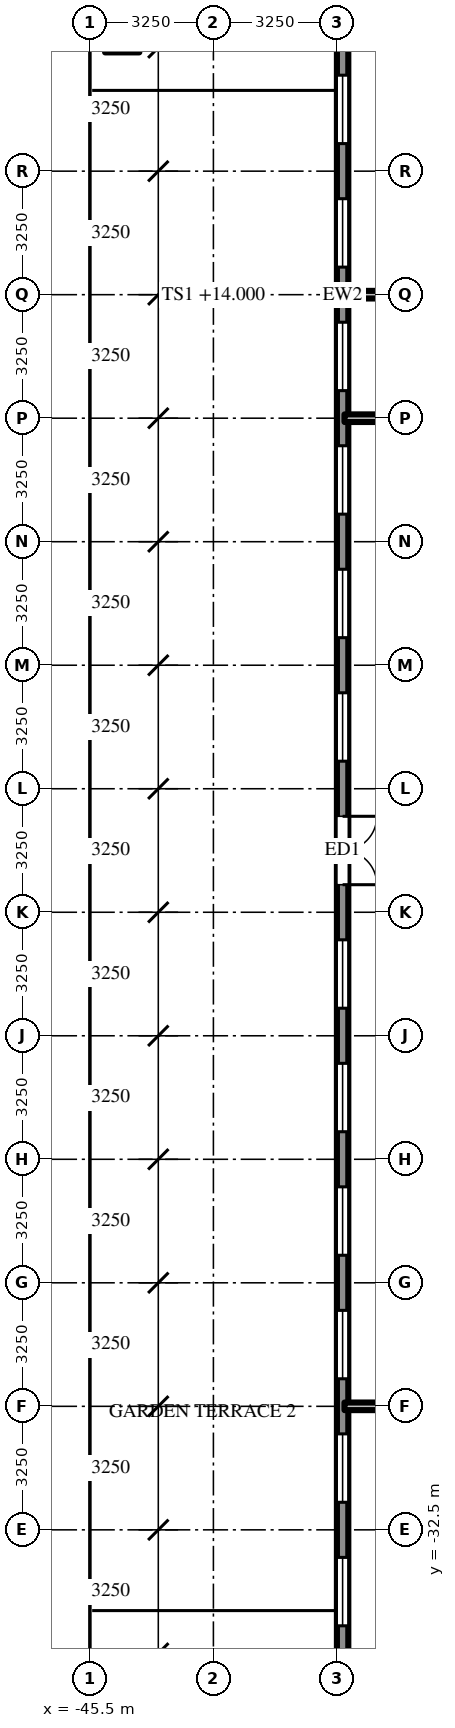
"""IFC4 building model, lengths in metres.
Left out: names, types, materials, properties, quantities, classifications, styles, units other than length and angle.
Written with IfcOpenShell. Run it as: python <this file> out.ifc"""

import sys

from ifc_helpers import new_model, si_unit, direction, frame, frame_2d, origin, place, context, subcontext, project, spatial, rectangle, extrude, source, transform, mapped, element, fill, save


model = new_model("IFC4")
c1 = context("Model", 3, precision=1e-05, world=origin(), true_north=direction((0.0, 1.0)))
c2 = subcontext(c1, "Body", "Model", "MODEL_VIEW")
j1 = project(units=[si_unit("LENGTHUNIT", "METRE"), si_unit("PLANEANGLEUNIT", "RADIAN")], contexts=[c1])
p1 = place(None, origin())
s1 = spatial("IfcSite", under=j1, at=p1, CompositionType="ELEMENT")
p2 = place(p1, origin())
s2 = spatial("IfcBuilding", under=s1, at=p2, CompositionType="ELEMENT")
p3 = place(p2, frame((0.0, 0.0, 14.0)))
s3 = spatial("IfcBuildingStorey", under=s2, at=p3, CompositionType="ELEMENT", Elevation=14.0)
m1 = source(origin(), c2, "Body", "SweptSolid", [
    extrude(rectangle(XDim=71.5, YDim=0.3, at=frame_2d((35.75, 0.0))), origin(), (0.0, 0.0, 1.0), 4.7),
])
p4 = place(p3, frame((-38.85, 35.75, 0.0), z_axis=(0.0, 0.0, 1.0), x_axis=(0.0, -1.0, 0.0)))
e1 = element("IfcWall", 1, at=p4, inside=s3, PredefinedType="SOLIDWALL", context=c2, shape_type="MappedRepresentation", body=[
    mapped(m1, transform((0.0, 0.0, 0.0))),
])
m2 = source(origin(), c2, "Body", "SweptSolid", [
    extrude(rectangle(XDim=1.8, YDim=3.0, at=frame_2d((0.9, 1.5))), frame((0.0, 0.16, 0.0), z_axis=(0.0, -1.0, 0.0), x_axis=(1.0, 0.0, 0.0)), (0.0, 0.0, 1.0), 0.32),
])
p5 = place(p4, frame((0.725, 0.0, 0.9)))
e2 = element("IfcOpeningElement", 2, at=p5, cuts=e1, PredefinedType="OPENING", context=c2, shape_type="MappedRepresentation", body=[
    mapped(m2, transform((0.0, 0.0, 0.0))),
])
p6 = place(p4, frame((3.975, 0.0, 0.9)))
e3 = element("IfcOpeningElement", 3, at=p6, cuts=e1, PredefinedType="OPENING", context=c2, shape_type="MappedRepresentation", body=[
    mapped(m2, transform((0.0, 0.0, 0.0))),
])
p7 = place(p4, frame((7.225, 0.0, 0.9)))
e4 = element("IfcOpeningElement", 4, at=p7, cuts=e1, PredefinedType="OPENING", context=c2, shape_type="MappedRepresentation", body=[
    mapped(m2, transform((0.0, 0.0, 0.0))),
])
p8 = place(p4, frame((10.475, 0.0, 0.9)))
e5 = element("IfcOpeningElement", 5, at=p8, cuts=e1, PredefinedType="OPENING", context=c2, shape_type="MappedRepresentation", body=[
    mapped(m2, transform((0.0, 0.0, 0.0))),
])
p9 = place(p4, frame((13.725, 0.0, 0.9)))
e6 = element("IfcOpeningElement", 6, at=p9, cuts=e1, PredefinedType="OPENING", context=c2, shape_type="MappedRepresentation", body=[
    mapped(m2, transform((0.0, 0.0, 0.0))),
])
p10 = place(p4, frame((16.975, 0.0, 0.9)))
e7 = element("IfcOpeningElement", 7, at=p10, cuts=e1, PredefinedType="OPENING", context=c2, shape_type="MappedRepresentation", body=[
    mapped(m2, transform((0.0, 0.0, 0.0))),
])
p11 = place(p4, frame((20.225, 0.0, 0.9)))
e8 = element("IfcOpeningElement", 8, at=p11, cuts=e1, PredefinedType="OPENING", context=c2, shape_type="MappedRepresentation", body=[
    mapped(m2, transform((0.0, 0.0, 0.0))),
])
p12 = place(p4, frame((23.475, 0.0, 0.9)))
e9 = element("IfcOpeningElement", 9, at=p12, cuts=e1, PredefinedType="OPENING", context=c2, shape_type="MappedRepresentation", body=[
    mapped(m2, transform((0.0, 0.0, 0.0))),
])
p13 = place(p4, frame((26.725, 0.0, 0.9)))
e10 = element("IfcOpeningElement", 10, at=p13, cuts=e1, PredefinedType="OPENING", context=c2, shape_type="MappedRepresentation", body=[
    mapped(m2, transform((0.0, 0.0, 0.0))),
])
p14 = place(p4, frame((29.975, 0.0, 0.9)))
e11 = element("IfcOpeningElement", 11, at=p14, cuts=e1, PredefinedType="OPENING", context=c2, shape_type="MappedRepresentation", body=[
    mapped(m2, transform((0.0, 0.0, 0.0))),
])
p15 = place(p4, frame((33.225, 0.0, 0.9)))
e12 = element("IfcOpeningElement", 12, at=p15, cuts=e1, PredefinedType="OPENING", context=c2, shape_type="MappedRepresentation", body=[
    mapped(m2, transform((0.0, 0.0, 0.0))),
])
p16 = place(p4, frame((36.475, 0.0, 0.9)))
e13 = element("IfcOpeningElement", 13, at=p16, cuts=e1, PredefinedType="OPENING", context=c2, shape_type="MappedRepresentation", body=[
    mapped(m2, transform((0.0, 0.0, 0.0))),
])
p17 = place(p4, frame((39.725, 0.0, 0.9)))
e14 = element("IfcOpeningElement", 14, at=p17, cuts=e1, PredefinedType="OPENING", context=c2, shape_type="MappedRepresentation", body=[
    mapped(m2, transform((0.0, 0.0, 0.0))),
])
p18 = place(p4, frame((42.975, 0.0, 0.9)))
e15 = element("IfcOpeningElement", 15, at=p18, cuts=e1, PredefinedType="OPENING", context=c2, shape_type="MappedRepresentation", body=[
    mapped(m2, transform((0.0, 0.0, 0.0))),
])
p19 = place(p4, frame((46.225, 0.0, 0.9)))
e16 = element("IfcOpeningElement", 16, at=p19, cuts=e1, PredefinedType="OPENING", context=c2, shape_type="MappedRepresentation", body=[
    mapped(m2, transform((0.0, 0.0, 0.0))),
])
m3 = source(origin(), c2, "Body", "SweptSolid", [
    extrude(rectangle(XDim=1.8, YDim=2.4, at=frame_2d((0.9, 1.2))), frame((0.0, 0.16, 0.0), z_axis=(0.0, -1.0, 0.0), x_axis=(1.0, 0.0, 0.0)), (0.0, 0.0, 1.0), 0.32),
])
p20 = place(p4, frame((49.475, 0.0, 0.0)))
e17 = element("IfcOpeningElement", 17, at=p20, cuts=e1, PredefinedType="OPENING", context=c2, shape_type="MappedRepresentation", body=[
    mapped(m3, transform((0.0, 0.0, 0.0))),
])
p21 = place(p4, frame((52.725, 0.0, 0.9)))
e18 = element("IfcOpeningElement", 18, at=p21, cuts=e1, PredefinedType="OPENING", context=c2, shape_type="MappedRepresentation", body=[
    mapped(m2, transform((0.0, 0.0, 0.0))),
])
p22 = place(p4, frame((55.975, 0.0, 0.9)))
e19 = element("IfcOpeningElement", 19, at=p22, cuts=e1, PredefinedType="OPENING", context=c2, shape_type="MappedRepresentation", body=[
    mapped(m2, transform((0.0, 0.0, 0.0))),
])
p23 = place(p4, frame((59.225, 0.0, 0.9)))
e20 = element("IfcOpeningElement", 20, at=p23, cuts=e1, PredefinedType="OPENING", context=c2, shape_type="MappedRepresentation", body=[
    mapped(m2, transform((0.0, 0.0, 0.0))),
])
p24 = place(p4, frame((62.475, 0.0, 0.9)))
e21 = element("IfcOpeningElement", 21, at=p24, cuts=e1, PredefinedType="OPENING", context=c2, shape_type="MappedRepresentation", body=[
    mapped(m2, transform((0.0, 0.0, 0.0))),
])
p25 = place(p4, frame((65.725, 0.0, 0.9)))
e22 = element("IfcOpeningElement", 22, at=p25, cuts=e1, PredefinedType="OPENING", context=c2, shape_type="MappedRepresentation", body=[
    mapped(m2, transform((0.0, 0.0, 0.0))),
])
p26 = place(p4, frame((68.975, 0.0, 0.9)))
e23 = element("IfcOpeningElement", 23, at=p26, cuts=e1, PredefinedType="OPENING", context=c2, shape_type="MappedRepresentation", body=[
    mapped(m2, transform((0.0, 0.0, 0.0))),
])
m4 = source(origin(), c2, "Body", "SweptSolid", [
    extrude(rectangle(XDim=9.613, YDim=0.2, at=frame_2d((4.806, 0.0))), origin(), (0.0, 0.0, 1.0), 3.762),
])
p27 = place(p3, frame((-38.8, -29.25, 0.0), z_axis=(0.0, 0.0, 1.0), x_axis=(1.0, 0.0, 0.0)))
e24 = element("IfcWall", 24, at=p27, inside=s3, PredefinedType="PARTITIONING", context=c2, shape_type="MappedRepresentation", body=[
    mapped(m4, transform((0.0, 0.0, 0.0))),
])
m5 = source(origin(), c2, "Body", "SweptSolid", [
    extrude(rectangle(XDim=9.613, YDim=0.2, at=frame_2d((4.806, 0.0))), origin(), (0.0, 0.0, 1.0), 3.918),
])
p28 = place(p3, frame((-29.188, -3.25, 0.0), z_axis=(0.0, 0.0, 1.0), x_axis=(-1.0, 0.0, 0.0)))
e25 = element("IfcWall", 25, at=p28, inside=s3, PredefinedType="PARTITIONING", context=c2, shape_type="MappedRepresentation", body=[
    mapped(m5, transform((0.0, 0.0, 0.0))),
])
m6 = source(origin(), c2, "Body", "SweptSolid", [
    extrude(rectangle(XDim=9.55, YDim=0.2, at=frame_2d((4.775, 0.0))), origin(), (0.0, 0.0, 1.0), 3.918),
])
p29 = place(p3, frame((-38.8, 0.0, 0.0), z_axis=(0.0, 0.0, 1.0), x_axis=(1.0, 0.0, 0.0)))
e26 = element("IfcWall", 26, at=p29, inside=s3, PredefinedType="PARTITIONING", context=c2, shape_type="MappedRepresentation", body=[
    mapped(m6, transform((0.0, 0.0, 0.0))),
])
m7 = source(origin(), c2, "Body", "SweptSolid", [
    extrude(rectangle(XDim=1.8, YDim=3.0, at=frame_2d((0.9, 1.5))), frame((0.0, 0.03, 0.0), z_axis=(0.0, -1.0, 0.0), x_axis=(1.0, 0.0, 0.0)), (0.0, 0.0, 1.0), 0.06),
])
p30 = place(p14, origin())
e27 = element("IfcWindow", 27, at=p30, inside=s3, PartitioningType="SINGLE_PANEL", PredefinedType="WINDOW", context=c2, shape_type="MappedRepresentation", body=[
    mapped(m7, transform((0.0, 0.0, 0.0))),
])
fill(e11, e27)
p31 = place(p15, origin())
e28 = element("IfcWindow", 28, at=p31, inside=s3, PartitioningType="SINGLE_PANEL", PredefinedType="WINDOW", context=c2, shape_type="MappedRepresentation", body=[
    mapped(m7, transform((0.0, 0.0, 0.0))),
])
fill(e12, e28)
p32 = place(p16, origin())
e29 = element("IfcWindow", 29, at=p32, inside=s3, PartitioningType="SINGLE_PANEL", PredefinedType="WINDOW", context=c2, shape_type="MappedRepresentation", body=[
    mapped(m7, transform((0.0, 0.0, 0.0))),
])
fill(e13, e29)
p33 = place(p17, origin())
e30 = element("IfcWindow", 30, at=p33, inside=s3, PartitioningType="SINGLE_PANEL", PredefinedType="WINDOW", context=c2, shape_type="MappedRepresentation", body=[
    mapped(m7, transform((0.0, 0.0, 0.0))),
])
fill(e14, e30)
p34 = place(p18, origin())
e31 = element("IfcWindow", 31, at=p34, inside=s3, PartitioningType="SINGLE_PANEL", PredefinedType="WINDOW", context=c2, shape_type="MappedRepresentation", body=[
    mapped(m7, transform((0.0, 0.0, 0.0))),
])
fill(e15, e31)
p35 = place(p19, origin())
e32 = element("IfcWindow", 32, at=p35, inside=s3, PartitioningType="SINGLE_PANEL", PredefinedType="WINDOW", context=c2, shape_type="MappedRepresentation", body=[
    mapped(m7, transform((0.0, 0.0, 0.0))),
])
fill(e16, e32)
m8 = source(origin(), c2, "Body", "SweptSolid", [
    extrude(rectangle(XDim=1.8, YDim=2.4, at=frame_2d((0.9, 1.2))), frame((0.0, 0.025, 0.0), z_axis=(0.0, -1.0, 0.0), x_axis=(1.0, 0.0, 0.0)), (0.0, 0.0, 1.0), 0.05),
])
p36 = place(p20, origin())
e33 = element("IfcDoor", 33, at=p36, inside=s3, OperationType="DOUBLE_DOOR_SINGLE_SWING", PredefinedType="DOOR", context=c2, shape_type="MappedRepresentation", body=[
    mapped(m8, transform((0.0, 0.0, 0.0))),
])
fill(e17, e33)
p37 = place(p21, origin())
e34 = element("IfcWindow", 34, at=p37, inside=s3, PartitioningType="SINGLE_PANEL", PredefinedType="WINDOW", context=c2, shape_type="MappedRepresentation", body=[
    mapped(m7, transform((0.0, 0.0, 0.0))),
])
fill(e18, e34)
p38 = place(p22, origin())
e35 = element("IfcWindow", 35, at=p38, inside=s3, PartitioningType="SINGLE_PANEL", PredefinedType="WINDOW", context=c2, shape_type="MappedRepresentation", body=[
    mapped(m7, transform((0.0, 0.0, 0.0))),
])
fill(e19, e35)
p39 = place(p23, origin())
e36 = element("IfcWindow", 36, at=p39, inside=s3, PartitioningType="SINGLE_PANEL", PredefinedType="WINDOW", context=c2, shape_type="MappedRepresentation", body=[
    mapped(m7, transform((0.0, 0.0, 0.0))),
])
fill(e20, e36)
p40 = place(p24, origin())
e37 = element("IfcWindow", 37, at=p40, inside=s3, PartitioningType="SINGLE_PANEL", PredefinedType="WINDOW", context=c2, shape_type="MappedRepresentation", body=[
    mapped(m7, transform((0.0, 0.0, 0.0))),
])
fill(e21, e37)
p41 = place(p25, origin())
e38 = element("IfcWindow", 38, at=p41, inside=s3, PartitioningType="SINGLE_PANEL", PredefinedType="WINDOW", context=c2, shape_type="MappedRepresentation", body=[
    mapped(m7, transform((0.0, 0.0, 0.0))),
])
fill(e22, e38)
p42 = place(p26, origin())
e39 = element("IfcWindow", 39, at=p42, inside=s3, PartitioningType="SINGLE_PANEL", PredefinedType="WINDOW", context=c2, shape_type="MappedRepresentation", body=[
    mapped(m7, transform((0.0, 0.0, 0.0))),
])
fill(e23, e39)
save(model, sys.argv[1])
